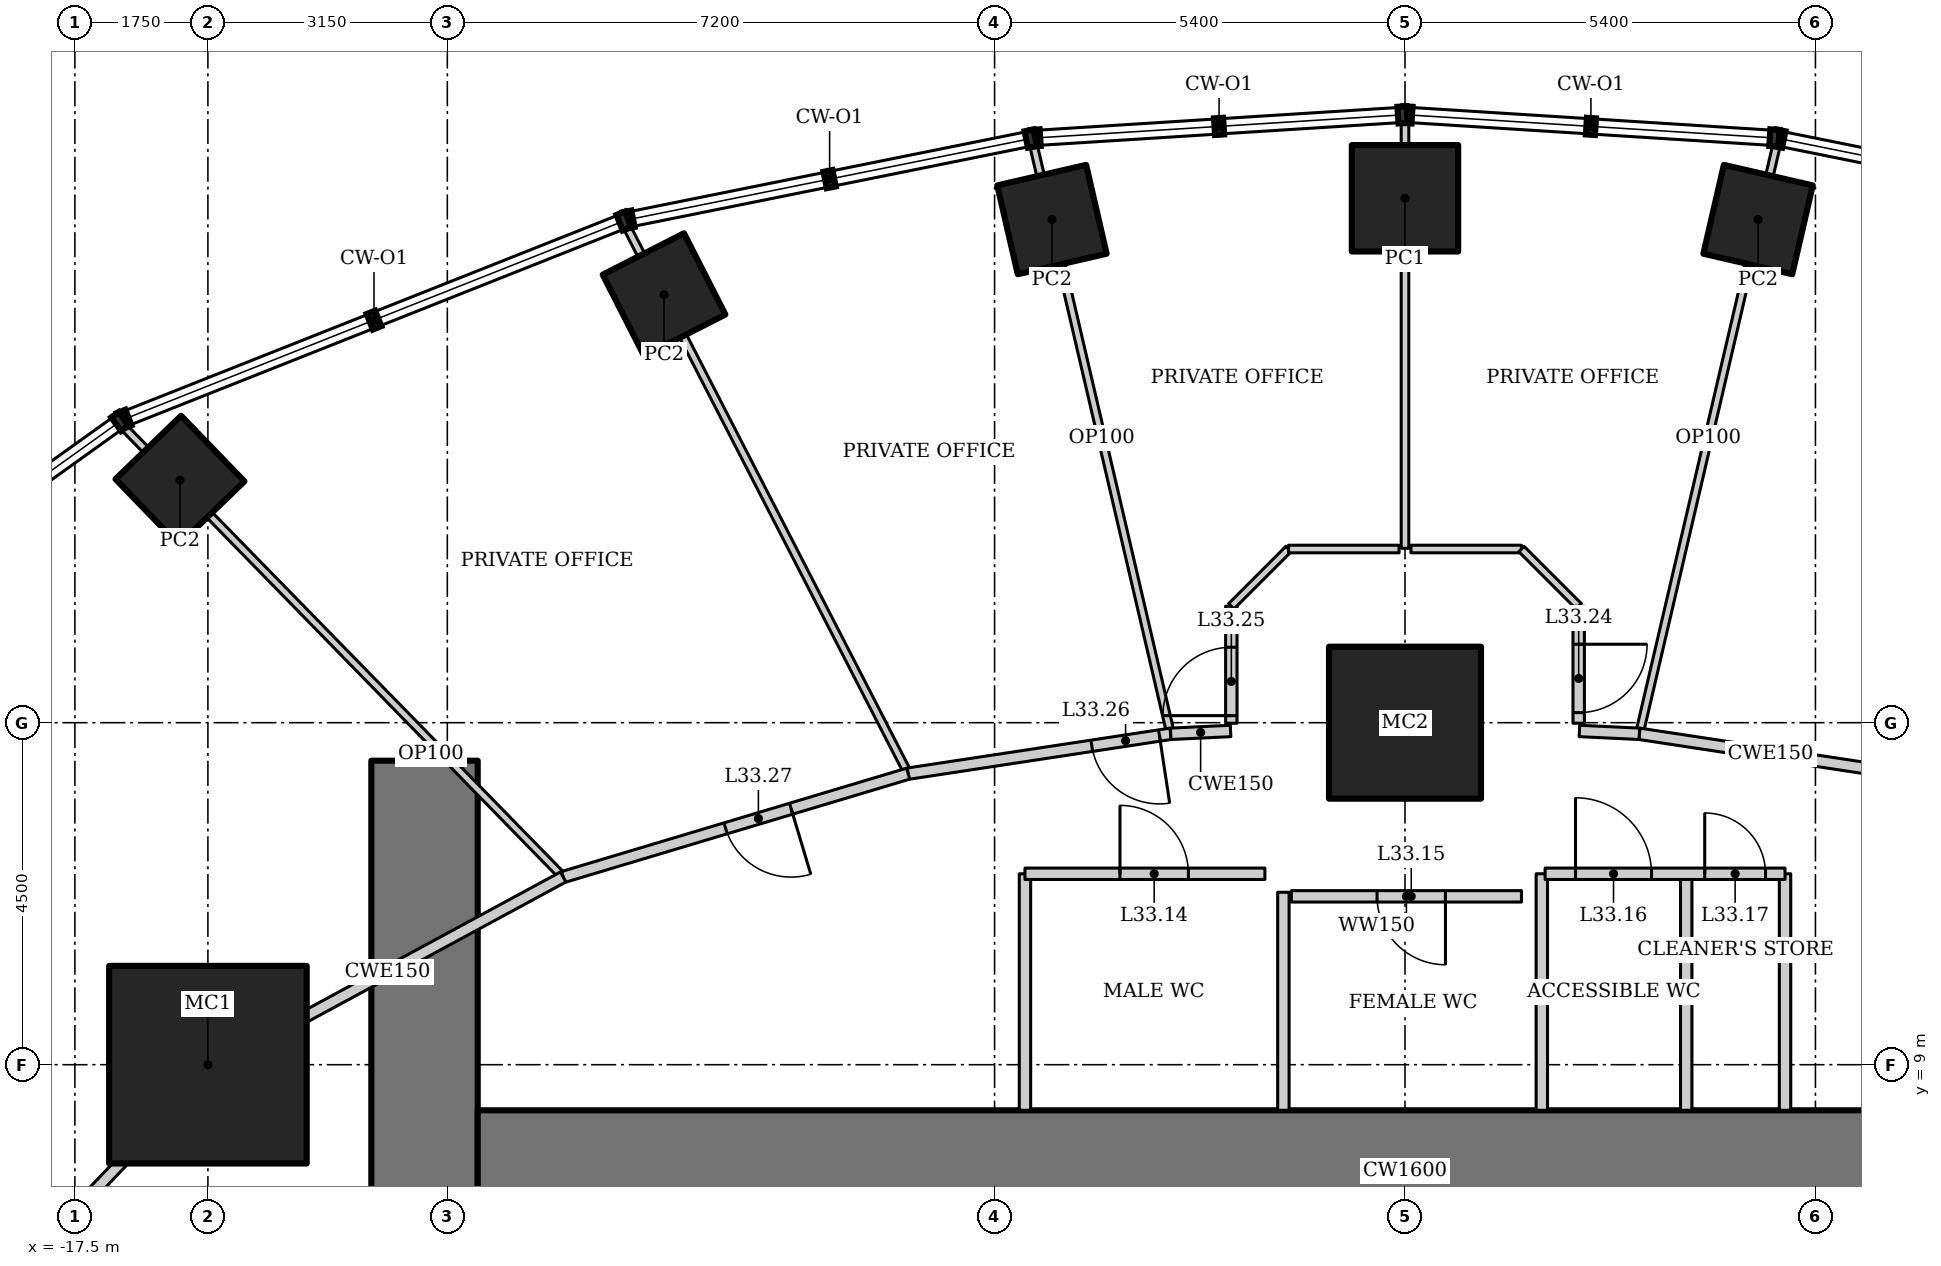
"""IFC4 building model, lengths in metres.
Left out: names, types, materials, properties, quantities, classifications, styles, units other than length and angle.
Written with IfcOpenShell. Run it as: python <this file> out.ifc"""

import sys

from ifc_helpers import new_model, si_unit, direction, frame, frame_2d, origin, origin_2d, place, context, subcontext, project, spatial, rectangle, hollow_rectangle, extrude, element, fill, save


model = new_model("IFC4")
c1 = context("Model", 3, precision=1e-05, world=origin(), true_north=direction((0.0, 1.0)))
c2 = subcontext(c1, "Body", "Model", "MODEL_VIEW")
j1 = project(units=[si_unit("LENGTHUNIT", "METRE"), si_unit("PLANEANGLEUNIT", "RADIAN")], contexts=[c1])
p1 = place(None, origin())
s1 = spatial("IfcSite", under=j1, at=p1, CompositionType="ELEMENT")
p2 = place(p1, origin())
s2 = spatial("IfcBuilding", under=s1, at=p2, CompositionType="ELEMENT")
p3 = place(p2, frame((0.0, 0.0, 142.6)))
s3 = spatial("IfcBuildingStorey", under=s2, at=p3, CompositionType="ELEMENT", Elevation=142.6)
p4 = place(p3, frame((0.0, 13.5, 0.0), z_axis=(0.0, 0.0, 1.0), x_axis=(1.0, 0.0, 0.0)))
e1 = element("IfcColumn", 1, at=p4, inside=s3, PredefinedType="COLUMN", context=c2, shape_type="SweptSolid", body=[
    extrude(hollow_rectangle(XDim=2.0, YDim=2.0, WallThickness=0.17, at=origin_2d()), origin(), (0.0, 0.0, 1.0), 4.2),
])
p5 = place(p3, frame((-15.75, 9.0, 0.0), z_axis=(0.0, 0.0, 1.0), x_axis=(1.0, 0.0, 0.0)))
e2 = element("IfcColumn", 2, at=p5, inside=s3, PredefinedType="COLUMN", context=c2, shape_type="SweptSolid", body=[
    extrude(hollow_rectangle(XDim=2.6, YDim=2.6, WallThickness=0.13, at=origin_2d()), origin(), (0.0, 0.0, 1.0), 4.2),
])
p6 = place(p3, frame((4.645, 20.12, 0.0), z_axis=(0.0, 0.0, 1.0), x_axis=(0.224951054344, 0.974370064785, 0.0)))
e3 = element("IfcColumn", 3, at=p6, inside=s3, PredefinedType="COLUMN", context=c2, shape_type="SweptSolid", body=[
    extrude(hollow_rectangle(XDim=1.2, YDim=1.2, WallThickness=0.1, at=origin_2d()), origin(), (0.0, 0.0, 1.0), 4.2),
])
p7 = place(p3, frame((0.0, 20.4, 0.0), z_axis=(0.0, 0.0, 1.0), x_axis=(1.0, 0.0, 0.0)))
e4 = element("IfcColumn", 4, at=p7, inside=s3, PredefinedType="COLUMN", context=c2, shape_type="SweptSolid", body=[
    extrude(hollow_rectangle(XDim=1.4, YDim=1.4, WallThickness=0.1, at=origin_2d()), origin(), (0.0, 0.0, 1.0), 4.2),
])
for number, where, z_axis, x_axis in (
    (5, (-4.645, 20.12, 0.0), (0.0, 0.0, 1.0), (0.974, 0.225, 0.0)),
    (6, (-9.749, 19.133, 0.0), (0.0, 0.0, 1.0), (0.891, 0.454, 0.0)),
    (7, (-16.118, 16.69, 0.0), (0.0, 0.0, 1.0), (0.719, 0.695, 0.0)),
):
    element("IfcColumn", number, at=place(p3, frame(where, z_axis=z_axis, x_axis=x_axis)), inside=s3, PredefinedType="COLUMN", context=c2, shape_type="SweptSolid", body=[
        extrude(hollow_rectangle(XDim=1.2, YDim=1.2, WallThickness=0.1, at=origin_2d()), origin(), (0.0, 0.0, 1.0), 4.2),
    ])
p8 = place(p3, frame((-12.9, 13.0, 0.0), z_axis=(0.0, 0.0, 1.0), x_axis=(0.0, -1.0, 0.0)))
e8 = element("IfcWall", 8, at=p8, inside=s3, PredefinedType="SHEAR", context=c2, shape_type="SweptSolid", body=[
    extrude(rectangle(XDim=26.0, YDim=1.4, at=frame_2d((13.0, 0.0))), origin(), (0.0, 0.0, 1.0), 4.2),
])
p9 = place(p8, frame((12.1, 0.0, 0.0)))
e9 = element("IfcOpeningElement", 9, at=p9, cuts=e8, PredefinedType="OPENING", context=c2, shape_type="SweptSolid", body=[
    extrude(rectangle(XDim=1.8, YDim=2.1, at=frame_2d((0.9, 1.05))), frame((0.0, 0.71, 0.0), z_axis=(0.0, -1.0, 0.0), x_axis=(1.0, 0.0, 0.0)), (0.0, 0.0, 1.0), 1.42),
])
p10 = place(p3, frame((12.2, 7.6, 0.0), z_axis=(0.0, 0.0, 1.0), x_axis=(-1.0, 0.0, 0.0)))
e10 = element("IfcWall", 10, at=p10, inside=s3, PredefinedType="SHEAR", context=c2, shape_type="SweptSolid", body=[
    extrude(rectangle(XDim=24.4, YDim=1.6, at=frame_2d((12.2, 0.0))), origin(), (0.0, 0.0, 1.0), 4.2),
])
for number, where, z_axis, x_axis in (
    (11, (4.897, 21.135, 0.0), (0.0, 0.0, 1.0), (-0.227, -0.974, 0.0)),
    (12, (-4.897, 21.135, 0.0), (0.0, 0.0, 1.0), (0.227, -0.974, 0.0)),
):
    element("IfcWall", number, at=place(p3, frame(where, z_axis=z_axis, x_axis=x_axis)), inside=s3, PredefinedType="PARTITIONING", context=c2, shape_type="SweptSolid", body=[
        extrude(rectangle(XDim=7.99, YDim=0.1, at=frame_2d((3.995, 0.0))), origin(), (0.0, 0.0, 1.0), 3.293),
    ])
p11 = place(p3, frame((-10.253, 20.052, 0.0), z_axis=(0.0, 0.0, 1.0), x_axis=(0.457535449567, -0.889191381194, 0.0)))
e13 = element("IfcWall", 13, at=p11, inside=s3, PredefinedType="PARTITIONING", context=c2, shape_type="SweptSolid", body=[
    extrude(rectangle(XDim=8.123, YDim=0.1, at=frame_2d((4.061, 0.0))), origin(), (0.0, 0.0, 1.0), 3.349),
])
p12 = place(p3, frame((-16.882, 17.414, 0.0), z_axis=(0.0, 0.0, 1.0), x_axis=(0.698758056249, -0.715358077348, 0.0)))
e14 = element("IfcWall", 14, at=p12, inside=s3, PredefinedType="PARTITIONING", context=c2, shape_type="SweptSolid", body=[
    extrude(rectangle(XDim=8.31, YDim=0.1, at=frame_2d((4.155, 0.0))), origin(), (0.0, 0.0, 1.0), 3.321),
])
p13 = place(p3, frame((6.537, 12.829, 0.0), z_axis=(0.0, 0.0, 1.0), x_axis=(-0.988668719464, 0.150113833987, 0.0)))
e15 = element("IfcWall", 15, at=p13, inside=s3, PredefinedType="PARTITIONING", context=c2, shape_type="SweptSolid", body=[
    extrude(rectangle(XDim=3.493, YDim=0.15, at=frame_2d((1.747, 0.0))), origin(), (0.0, 0.0, 1.0), 4.05),
])
p14 = place(p3, frame((-3.083, 13.354, 0.0), z_axis=(0.0, 0.0, 1.0), x_axis=(-0.988668719464, -0.150113833987, 0.0)))
e16 = element("IfcWall", 16, at=p14, inside=s3, PredefinedType="PARTITIONING", context=c2, shape_type="SweptSolid", body=[
    extrude(rectangle(XDim=3.493, YDim=0.15, at=frame_2d((1.747, 0.0))), origin(), (0.0, 0.0, 1.0), 4.05),
])
p15 = place(p14, frame((0.15, 0.0, 0.0)))
e17 = element("IfcOpeningElement", 17, at=p15, cuts=e16, PredefinedType="OPENING", context=c2, shape_type="SweptSolid", body=[
    extrude(rectangle(XDim=0.9, YDim=2.1, at=frame_2d((0.45, 1.05))), frame((0.0, 0.085, 0.0), z_axis=(0.0, -1.0, 0.0), x_axis=(1.0, 0.0, 0.0)), (0.0, 0.0, 1.0), 0.17),
])
p16 = place(p3, frame((-6.537, 12.829, 0.0), z_axis=(0.0, 0.0, 1.0), x_axis=(-0.957933992798, -0.286988615527, 0.0)))
e18 = element("IfcWall", 18, at=p16, inside=s3, PredefinedType="PARTITIONING", context=c2, shape_type="SweptSolid", body=[
    extrude(rectangle(XDim=4.738, YDim=0.15, at=frame_2d((2.369, 0.0))), origin(), (0.0, 0.0, 1.0), 4.05),
])
p17 = place(p16, frame((1.607, 0.0, 0.0)))
e19 = element("IfcOpeningElement", 19, at=p17, cuts=e18, PredefinedType="OPENING", context=c2, shape_type="SweptSolid", body=[
    extrude(rectangle(XDim=0.9, YDim=2.1, at=frame_2d((0.45, 1.05))), frame((0.0, 0.085, 0.0), z_axis=(0.0, -1.0, 0.0), x_axis=(1.0, 0.0, 0.0)), (0.0, 0.0, 1.0), 0.17),
])
p18 = place(p3, frame((-11.076, 11.469, 0.0), z_axis=(0.0, 0.0, 1.0), x_axis=(-0.879436285334, -0.476016617397, 0.0)))
e20 = element("IfcWall", 20, at=p18, inside=s3, PredefinedType="PARTITIONING", context=c2, shape_type="SweptSolid", body=[
    extrude(rectangle(XDim=5.253, YDim=0.15, at=frame_2d((2.626, 0.0))), origin(), (0.0, 0.0, 1.0), 4.05),
])
p19 = place(p3, frame((-15.696, 8.969, 0.0), z_axis=(0.0, 0.0, 1.0), x_axis=(-0.688797257101, -0.72495402517, 0.0)))
e21 = element("IfcWall", 21, at=p19, inside=s3, PredefinedType="PARTITIONING", context=c2, shape_type="SweptSolid", body=[
    extrude(rectangle(XDim=5.638, YDim=0.15, at=frame_2d((2.819, 0.0))), origin(), (0.0, 0.0, 1.0), 4.05),
])
p20 = place(p19, frame((4.588, 0.0, 0.0)))
e22 = element("IfcOpeningElement", 22, at=p20, cuts=e21, PredefinedType="OPENING", context=c2, shape_type="SweptSolid", body=[
    extrude(rectangle(XDim=0.9, YDim=2.1, at=frame_2d((0.45, 1.05))), frame((0.0, 0.085, 0.0), z_axis=(0.0, -1.0, 0.0), x_axis=(1.0, 0.0, 0.0)), (0.0, 0.0, 1.0), 0.17),
])
for number, where, z_axis, x_axis in (
    (23, (-5.0, 8.4, 0.0), (0.0, 0.0, 1.0), (0.0, 1.0, 0.0)),
    (24, (5.0, 8.4, 0.0), (0.0, 0.0, 1.0), (0.0, 1.0, 0.0)),
    (25, (1.8, 8.4, 0.0), (0.0, 0.0, 1.0), (0.0, 1.0, 0.0)),
    (26, (3.7, 8.4, 0.0), (0.0, 0.0, 1.0), (0.0, 1.0, 0.0)),
):
    element("IfcWall", number, at=place(p3, frame(where, z_axis=z_axis, x_axis=x_axis)), inside=s3, PredefinedType="SOLIDWALL", context=c2, shape_type="SweptSolid", body=[
        extrude(rectangle(XDim=3.112, YDim=0.15, at=frame_2d((1.556, 0.0))), origin(), (0.0, 0.0, 1.0), 4.05),
    ])
p21 = place(p3, frame((-12.9, 13.0, 0.0), z_axis=(0.0, 0.0, 1.0), x_axis=(0.714845300066, 0.699282630253, 0.0)))
e27 = element("IfcWall", 27, at=p21, inside=s3, PredefinedType="PARTITIONING", context=c2, shape_type="SweptSolid", body=[
    extrude(rectangle(XDim=0.235, YDim=0.1, at=frame_2d((0.118, 0.0))), origin(), (0.0, 0.0, 1.0), 4.05),
])
p22 = place(p3, frame((0.0, 21.445, 0.0), z_axis=(0.0, 0.0, 1.0), x_axis=(0.0, -1.0, 0.0)))
e28 = element("IfcWall", 28, at=p22, inside=s3, PredefinedType="PARTITIONING", context=c2, shape_type="SweptSolid", body=[
    extrude(rectangle(XDim=5.65, YDim=0.1, at=frame_2d((2.825, 0.0))), origin(), (0.0, 0.0, 1.0), 3.646),
])
for number, where, z_axis, x_axis in (
    (29, (3.083, 13.354, 0.0), (0.0, 0.0, 1.0), (-0.999, 0.047, 0.0)),
    (30, (-2.295, 13.391, 0.0), (0.0, 0.0, 1.0), (-0.999, -0.047, 0.0)),
):
    element("IfcWall", number, at=place(p3, frame(where, z_axis=z_axis, x_axis=x_axis)), inside=s3, PredefinedType="PARTITIONING", context=c2, shape_type="SweptSolid", body=[
        extrude(rectangle(XDim=0.789, YDim=0.15, at=frame_2d((0.395, 0.0))), origin(), (0.0, 0.0, 1.0), 4.05),
    ])
p23 = place(p3, frame((-5.0, 11.512, 0.0), z_axis=(0.0, 0.0, 1.0), x_axis=(1.0, 0.0, 0.0)))
e31 = element("IfcWall", 31, at=p23, inside=s3, PredefinedType="SOLIDWALL", context=c2, shape_type="SweptSolid", body=[
    extrude(rectangle(XDim=3.156, YDim=0.15, at=frame_2d((1.578, 0.0))), origin(), (0.0, 0.0, 1.0), 4.05),
])
p24 = place(p23, frame((1.25, 0.0, 0.0)))
e32 = element("IfcOpeningElement", 32, at=p24, cuts=e31, PredefinedType="OPENING", context=c2, shape_type="SweptSolid", body=[
    extrude(rectangle(XDim=0.9, YDim=2.1, at=frame_2d((0.45, 1.05))), frame((0.0, 0.085, 0.0), z_axis=(0.0, -1.0, 0.0), x_axis=(1.0, 0.0, 0.0)), (0.0, 0.0, 1.0), 0.17),
])
p25 = place(p3, frame((1.844, 11.512, 0.0), z_axis=(0.0, 0.0, 1.0), x_axis=(1.0, 0.0, 0.0)))
e33 = element("IfcWall", 33, at=p25, inside=s3, PredefinedType="SOLIDWALL", context=c2, shape_type="SweptSolid", body=[
    extrude(rectangle(XDim=3.156, YDim=0.15, at=frame_2d((1.578, 0.0))), origin(), (0.0, 0.0, 1.0), 4.05),
])
p26 = place(p25, frame((0.4, 0.0, 0.0)))
e34 = element("IfcOpeningElement", 34, at=p26, cuts=e33, PredefinedType="OPENING", context=c2, shape_type="SweptSolid", body=[
    extrude(rectangle(XDim=1.0, YDim=2.1, at=frame_2d((0.5, 1.05))), frame((0.0, 0.085, 0.0), z_axis=(0.0, -1.0, 0.0), x_axis=(1.0, 0.0, 0.0)), (0.0, 0.0, 1.0), 0.17),
])
p27 = place(p25, frame((2.1, 0.0, 0.0)))
e35 = element("IfcOpeningElement", 35, at=p27, cuts=e33, PredefinedType="OPENING", context=c2, shape_type="SweptSolid", body=[
    extrude(rectangle(XDim=0.8, YDim=2.1, at=frame_2d((0.4, 1.05))), frame((0.0, 0.085, 0.0), z_axis=(0.0, -1.0, 0.0), x_axis=(1.0, 0.0, 0.0)), (0.0, 0.0, 1.0), 0.17),
])
p28 = place(p3, frame((-1.6, 8.4, 0.0), z_axis=(0.0, 0.0, 1.0), x_axis=(0.0, 1.0, 0.0)))
e36 = element("IfcWall", 36, at=p28, inside=s3, PredefinedType="SOLIDWALL", context=c2, shape_type="SweptSolid", body=[
    extrude(rectangle(XDim=2.869, YDim=0.15, at=frame_2d((1.434, 0.0))), origin(), (0.0, 0.0, 1.0), 4.05),
])
p29 = place(p3, frame((1.532, 11.215, 0.0), z_axis=(0.0, 0.0, 1.0), x_axis=(-1.0, 0.0, 0.0)))
e37 = element("IfcWall", 37, at=p29, inside=s3, PredefinedType="SOLIDWALL", context=c2, shape_type="SweptSolid", body=[
    extrude(rectangle(XDim=3.027, YDim=0.15, at=frame_2d((1.514, 0.0))), origin(), (0.0, 0.0, 1.0), 4.05),
])
p30 = place(p29, frame((1.0, 0.0, 0.0)))
e38 = element("IfcOpeningElement", 38, at=p30, cuts=e37, PredefinedType="OPENING", context=c2, shape_type="SweptSolid", body=[
    extrude(rectangle(XDim=0.9, YDim=2.1, at=frame_2d((0.45, 1.05))), frame((0.0, 0.085, 0.0), z_axis=(0.0, -1.0, 0.0), x_axis=(1.0, 0.0, 0.0)), (0.0, 0.0, 1.0), 0.17),
])
p31 = place(p3, frame((0.078, 15.785, 0.0), z_axis=(0.0, 0.0, 1.0), x_axis=(1.0, 0.0, 0.0)))
e39 = element("IfcWall", 39, at=p31, inside=s3, PredefinedType="PARTITIONING", context=c2, shape_type="SweptSolid", body=[
    extrude(rectangle(XDim=1.454, YDim=0.1, at=frame_2d((0.727, 0.0))), origin(), (0.0, 0.0, 1.0), 4.05),
])
p32 = place(p3, frame((1.532, 15.785, 0.0), z_axis=(0.0, 0.0, 1.0), x_axis=(0.707106781187, -0.707106781187, 0.0)))
e40 = element("IfcWall", 40, at=p32, inside=s3, PredefinedType="PARTITIONING", context=c2, shape_type="SweptSolid", body=[
    extrude(rectangle(XDim=1.064, YDim=0.1, at=frame_2d((0.532, 0.0))), origin(), (0.0, 0.0, 1.0), 4.05),
])
p33 = place(p3, frame((2.285, 15.032, 0.0), z_axis=(0.0, 0.0, 1.0), x_axis=(0.0, -1.0, 0.0)))
e41 = element("IfcWall", 41, at=p33, inside=s3, PredefinedType="PARTITIONING", context=c2, shape_type="SweptSolid", body=[
    extrude(rectangle(XDim=1.54, YDim=0.15, at=frame_2d((0.77, 0.0))), origin(), (0.0, 0.0, 1.0), 4.05),
])
p34 = place(p33, frame((0.5, 0.0, 0.0)))
e42 = element("IfcOpeningElement", 42, at=p34, cuts=e41, PredefinedType="OPENING", context=c2, shape_type="SweptSolid", body=[
    extrude(rectangle(XDim=0.9, YDim=2.1, at=frame_2d((0.45, 1.05))), frame((0.0, 0.085, 0.0), z_axis=(0.0, -1.0, 0.0), x_axis=(1.0, 0.0, 0.0)), (0.0, 0.0, 1.0), 0.17),
])
p35 = place(p3, frame((-2.285, 13.493, 0.0), z_axis=(0.0, 0.0, 1.0), x_axis=(0.0, 1.0, 0.0)))
e43 = element("IfcWall", 43, at=p35, inside=s3, PredefinedType="PARTITIONING", context=c2, shape_type="SweptSolid", body=[
    extrude(rectangle(XDim=1.54, YDim=0.15, at=frame_2d((0.77, 0.0))), origin(), (0.0, 0.0, 1.0), 4.05),
])
p36 = place(p35, frame((0.1, 0.0, 0.0)))
e44 = element("IfcOpeningElement", 44, at=p36, cuts=e43, PredefinedType="OPENING", context=c2, shape_type="SweptSolid", body=[
    extrude(rectangle(XDim=0.9, YDim=2.1, at=frame_2d((0.45, 1.05))), frame((0.0, 0.085, 0.0), z_axis=(0.0, -1.0, 0.0), x_axis=(1.0, 0.0, 0.0)), (0.0, 0.0, 1.0), 0.17),
])
p37 = place(p3, frame((-2.285, 15.032, 0.0), z_axis=(0.0, 0.0, 1.0), x_axis=(0.707106781187, 0.707106781187, 0.0)))
e45 = element("IfcWall", 45, at=p37, inside=s3, PredefinedType="PARTITIONING", context=c2, shape_type="SweptSolid", body=[
    extrude(rectangle(XDim=1.064, YDim=0.1, at=frame_2d((0.532, 0.0))), origin(), (0.0, 0.0, 1.0), 4.05),
])
p38 = place(p3, frame((-1.532, 15.785, 0.0), z_axis=(0.0, 0.0, 1.0), x_axis=(1.0, 0.0, 0.0)))
e46 = element("IfcWall", 46, at=p38, inside=s3, PredefinedType="PARTITIONING", context=c2, shape_type="SweptSolid", body=[
    extrude(rectangle(XDim=1.454, YDim=0.1, at=frame_2d((0.727, 0.0))), origin(), (0.0, 0.0, 1.0), 4.05),
])
p39 = place(p24, origin())
e47 = element("IfcDoor", 47, at=p39, inside=s3, OperationType="SINGLE_SWING_LEFT", PredefinedType="DOOR", context=c2, shape_type="SweptSolid", body=[
    extrude(rectangle(XDim=0.9, YDim=2.1, at=frame_2d((0.45, 1.05))), frame((0.0, 0.025, 0.0), z_axis=(0.0, -1.0, 0.0), x_axis=(1.0, 0.0, 0.0)), (0.0, 0.0, 1.0), 0.05),
])
fill(e32, e47)
p40 = place(p30, origin())
e48 = element("IfcDoor", 48, at=p40, inside=s3, OperationType="SINGLE_SWING_LEFT", PredefinedType="DOOR", context=c2, shape_type="SweptSolid", body=[
    extrude(rectangle(XDim=0.9, YDim=2.1, at=frame_2d((0.45, 1.05))), frame((0.0, 0.025, 0.0), z_axis=(0.0, -1.0, 0.0), x_axis=(1.0, 0.0, 0.0)), (0.0, 0.0, 1.0), 0.05),
])
fill(e38, e48)
p41 = place(p26, origin())
e49 = element("IfcDoor", 49, at=p41, inside=s3, OperationType="SINGLE_SWING_LEFT", PredefinedType="DOOR", context=c2, shape_type="SweptSolid", body=[
    extrude(rectangle(XDim=1.0, YDim=2.1, at=frame_2d((0.5, 1.05))), frame((0.0, 0.025, 0.0), z_axis=(0.0, -1.0, 0.0), x_axis=(1.0, 0.0, 0.0)), (0.0, 0.0, 1.0), 0.05),
])
fill(e34, e49)
p42 = place(p27, origin())
e50 = element("IfcDoor", 50, at=p42, inside=s3, OperationType="SINGLE_SWING_LEFT", PredefinedType="DOOR", context=c2, shape_type="SweptSolid", body=[
    extrude(rectangle(XDim=0.8, YDim=2.1, at=frame_2d((0.4, 1.05))), frame((0.0, 0.025, 0.0), z_axis=(0.0, -1.0, 0.0), x_axis=(1.0, 0.0, 0.0)), (0.0, 0.0, 1.0), 0.05),
])
fill(e35, e50)
p43 = place(p34, origin())
e51 = element("IfcDoor", 51, at=p43, inside=s3, OperationType="SINGLE_SWING_LEFT", PredefinedType="DOOR", context=c2, shape_type="SweptSolid", body=[
    extrude(rectangle(XDim=0.9, YDim=2.1, at=frame_2d((0.45, 1.05))), frame((0.0, 0.025, 0.0), z_axis=(0.0, -1.0, 0.0), x_axis=(1.0, 0.0, 0.0)), (0.0, 0.0, 1.0), 0.05),
])
fill(e42, e51)
p44 = place(p36, origin())
e52 = element("IfcDoor", 52, at=p44, inside=s3, OperationType="SINGLE_SWING_LEFT", PredefinedType="DOOR", context=c2, shape_type="SweptSolid", body=[
    extrude(rectangle(XDim=0.9, YDim=2.1, at=frame_2d((0.45, 1.05))), frame((0.0, 0.025, 0.0), z_axis=(0.0, -1.0, 0.0), x_axis=(1.0, 0.0, 0.0)), (0.0, 0.0, 1.0), 0.05),
])
fill(e44, e52)
p45 = place(p15, origin())
e53 = element("IfcDoor", 53, at=p45, inside=s3, OperationType="SINGLE_SWING_LEFT", PredefinedType="DOOR", context=c2, shape_type="SweptSolid", body=[
    extrude(rectangle(XDim=0.9, YDim=2.1, at=frame_2d((0.45, 1.05))), frame((0.0, 0.025, 0.0), z_axis=(0.0, -1.0, 0.0), x_axis=(1.0, 0.0, 0.0)), (0.0, 0.0, 1.0), 0.05),
])
fill(e17, e53)
p46 = place(p17, origin())
e54 = element("IfcDoor", 54, at=p46, inside=s3, OperationType="SINGLE_SWING_LEFT", PredefinedType="DOOR", context=c2, shape_type="SweptSolid", body=[
    extrude(rectangle(XDim=0.9, YDim=2.1, at=frame_2d((0.45, 1.05))), frame((0.0, 0.025, 0.0), z_axis=(0.0, -1.0, 0.0), x_axis=(1.0, 0.0, 0.0)), (0.0, 0.0, 1.0), 0.05),
])
fill(e19, e54)
save(model, sys.argv[1])
